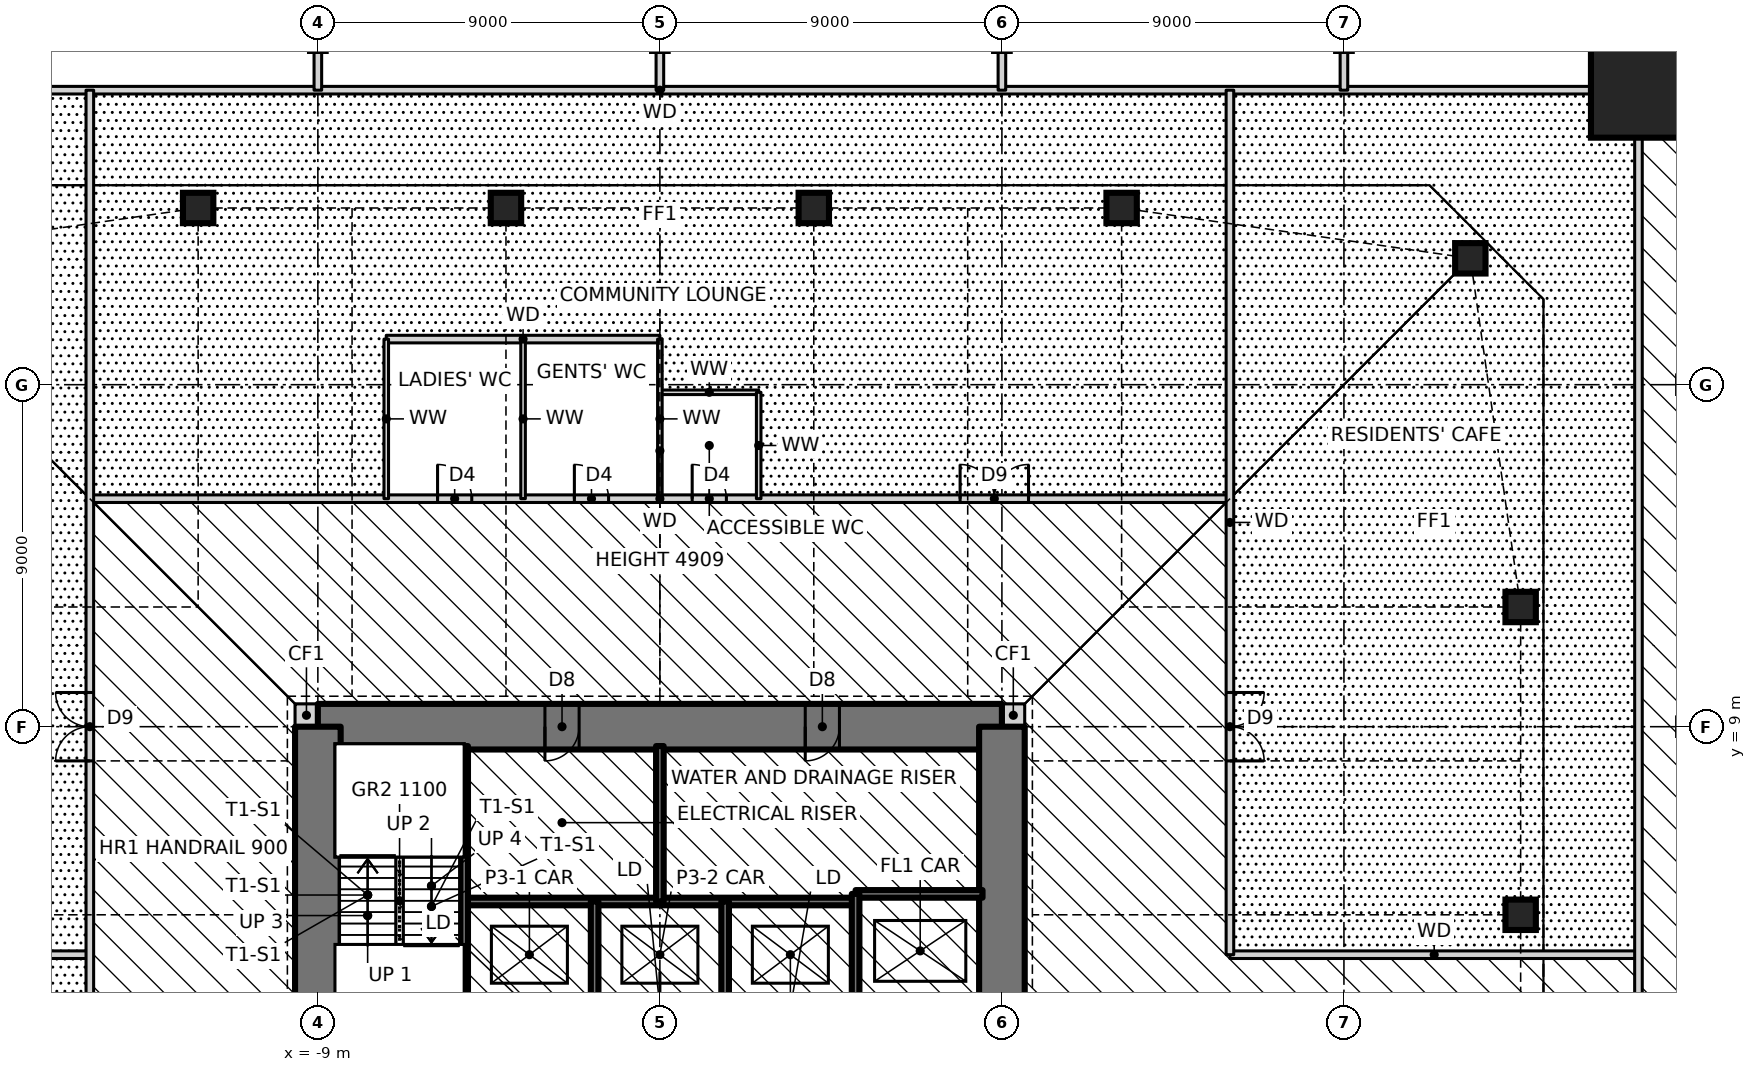
"""IFC4 building model, lengths in metres.
Left out: names, types, materials, properties, quantities, classifications, styles, units other than length and angle.
Written with IfcOpenShell. Run it as: python <this file> out.ifc"""

import sys

from ifc_helpers import new_model, si_unit, direction, frame, frame_2d, origin, origin_2d, place, context, subcontext, project, spatial, rectangle, hollow_rectangle, i_section, extrude, element, fill, save


model = new_model("IFC4")
c1 = context("Model", 3, precision=1e-05, world=origin(), true_north=direction((0.0, 1.0)))
c2 = subcontext(c1, "Body", "Model", "MODEL_VIEW")
j1 = project(units=[si_unit("LENGTHUNIT", "METRE"), si_unit("PLANEANGLEUNIT", "RADIAN")], contexts=[c1])
p1 = place(None, origin())
s1 = spatial("IfcSite", under=j1, at=p1, CompositionType="ELEMENT")
p2 = place(p1, origin())
s2 = spatial("IfcBuilding", under=s1, at=p2, CompositionType="ELEMENT")
p3 = place(p2, origin())
s3 = spatial("IfcBuildingStorey", under=s2, at=p3, CompositionType="ELEMENT", Elevation=0.0)
for number, where, z_axis, x_axis in (
    (1, (22.65, 4.05, 0.0), (0.0, 0.0, 1.0), (1.0, 0.0, 0.0)),
    (2, (22.65, 12.15, 0.0), (0.0, 0.0, 1.0), (1.0, 0.0, 0.0)),
    (3, (21.326, 21.326, 0.0), (0.0, 0.0, 1.0), (1.0, 0.0, 0.0)),
    (4, (12.15, 22.65, 0.0), (0.0, 0.0, 1.0), (1.0, 0.0, 0.0)),
    (5, (4.05, 22.65, 0.0), (0.0, 0.0, 1.0), (1.0, 0.0, 0.0)),
    (6, (-4.05, 22.65, 0.0), (0.0, 0.0, 1.0), (1.0, 0.0, 0.0)),
    (7, (-12.15, 22.65, 0.0), (0.0, 0.0, 1.0), (1.0, 0.0, 0.0)),
):
    element("IfcColumn", number, at=place(p3, frame(where, z_axis=z_axis, x_axis=x_axis)), inside=s3, PredefinedType="COLUMN", context=c2, shape_type="SweptSolid", body=[
        extrude(hollow_rectangle(XDim=0.8, YDim=0.8, WallThickness=0.09, at=origin_2d()), origin(), (0.0, 0.0, 1.0), 6.0),
    ])
p4 = place(p3, frame((27.0, 27.0, 0.0), z_axis=(0.0, 0.0, 1.0), x_axis=(1.0, 0.0, 0.0)))
e8 = element("IfcColumn", 8, at=p4, inside=s3, PredefinedType="COLUMN", context=c2, shape_type="SweptSolid", body=[
    extrude(rectangle(XDim=5.0, YDim=5.0, at=origin_2d()), origin(), (0.0, 0.0, 1.0), 6.0),
    extrude(i_section(OverallWidth=0.478, OverallDepth=0.599, WebThickness=0.1, FlangeThickness=0.14, at=origin_2d()), origin(), (0.0, 0.0, 1.0), 6.0),
])
for number, where, z_axis, x_axis in (
    (9, (9.0, 9.3, 0.0), (0.0, 0.0, 1.0), (1.0, 0.0, 0.0)),
    (10, (-9.6, 9.3, 0.0), (0.0, 0.0, 1.0), (1.0, 0.0, 0.0)),
):
    element("IfcWall", number, at=place(p3, frame(where, z_axis=z_axis, x_axis=x_axis)), inside=s3, PredefinedType="SOLIDWALL", context=c2, shape_type="SweptSolid", body=[
        extrude(rectangle(XDim=0.6, YDim=0.6, at=frame_2d((0.3, 0.0))), origin(), (0.0, 0.0, 1.0), 6.0),
    ])
p5 = place(p3, frame((9.0, 9.0, 0.0), z_axis=(0.0, 0.0, 1.0), x_axis=(-1.0, 0.0, 0.0)))
e11 = element("IfcWall", 11, at=p5, inside=s3, PredefinedType="SHEAR", context=c2, shape_type="SweptSolid", body=[
    extrude(rectangle(XDim=18.0, YDim=1.2, at=frame_2d((9.0, 0.0))), origin(), (0.0, 0.0, 1.0), 6.0),
])
p6 = place(p5, frame((11.125, 0.0, 0.0)))
e12 = element("IfcOpeningElement", 12, at=p6, cuts=e11, PredefinedType="OPENING", context=c2, shape_type="SweptSolid", body=[
    extrude(rectangle(XDim=0.9, YDim=2.1, at=frame_2d((0.45, 1.05))), frame((0.0, 0.61, 0.0), z_axis=(0.0, -1.0, 0.0), x_axis=(1.0, 0.0, 0.0)), (0.0, 0.0, 1.0), 1.22),
])
p7 = place(p5, frame((4.275, 0.0, 0.0)))
e13 = element("IfcOpeningElement", 13, at=p7, cuts=e11, PredefinedType="OPENING", context=c2, shape_type="SweptSolid", body=[
    extrude(rectangle(XDim=0.9, YDim=2.1, at=frame_2d((0.45, 1.05))), frame((0.0, 0.61, 0.0), z_axis=(0.0, -1.0, 0.0), x_axis=(1.0, 0.0, 0.0)), (0.0, 0.0, 1.0), 1.22),
])
p8 = place(p3, frame((9.0, -9.0, 0.0), z_axis=(0.0, 0.0, 1.0), x_axis=(0.0, 1.0, 0.0)))
e14 = element("IfcWall", 14, at=p8, inside=s3, PredefinedType="SHEAR", context=c2, shape_type="SweptSolid", body=[
    extrude(rectangle(XDim=18.0, YDim=1.2, at=frame_2d((9.0, 0.0))), origin(), (0.0, 0.0, 1.0), 6.0),
])
p9 = place(p8, frame((8.5, 0.0, 0.0)))
e15 = element("IfcOpeningElement", 15, at=p9, cuts=e14, PredefinedType="OPENING", context=c2, shape_type="SweptSolid", body=[
    extrude(rectangle(XDim=1.0, YDim=2.1, at=frame_2d((0.5, 1.05))), frame((0.0, 0.61, 0.0), z_axis=(0.0, -1.0, 0.0), x_axis=(1.0, 0.0, 0.0)), (0.0, 0.0, 1.0), 1.22),
])
p10 = place(p3, frame((-9.0, 9.0, 0.0), z_axis=(0.0, 0.0, 1.0), x_axis=(0.0, -1.0, 0.0)))
e16 = element("IfcWall", 16, at=p10, inside=s3, PredefinedType="SHEAR", context=c2, shape_type="SweptSolid", body=[
    extrude(rectangle(XDim=18.0, YDim=1.2, at=frame_2d((9.0, 0.0))), origin(), (0.0, 0.0, 1.0), 6.0),
])
p11 = place(p10, frame((8.5, 0.0, 0.0)))
e17 = element("IfcOpeningElement", 17, at=p11, cuts=e16, PredefinedType="OPENING", context=c2, shape_type="SweptSolid", body=[
    extrude(rectangle(XDim=1.0, YDim=2.1, at=frame_2d((0.5, 1.05))), frame((0.0, 0.61, 0.0), z_axis=(0.0, -1.0, 0.0), x_axis=(1.0, 0.0, 0.0)), (0.0, 0.0, 1.0), 1.22),
])
for number, where, z_axis, x_axis in (
    (18, (-25.75, 3.0, 0.0), (0.0, 0.0, 1.0), (1.0, 0.0, 0.0)),
    (19, (15.0, 3.0, 0.0), (0.0, 0.0, 1.0), (1.0, 0.0, 0.0)),
):
    element("IfcWall", number, at=place(p3, frame(where, z_axis=z_axis, x_axis=x_axis)), inside=s3, PredefinedType="SOLIDWALL", context=c2, shape_type="SweptSolid", body=[
        extrude(rectangle(XDim=10.75, YDim=0.2, at=frame_2d((5.375, 0.0))), origin(), (0.0, 0.0, 1.0), 5.75),
    ])
p12 = place(p3, frame((-5.15, 4.4, 0.0), z_axis=(0.0, 0.0, 1.0), x_axis=(1.0, 0.0, 0.0)))
e20 = element("IfcWall", 20, at=p12, inside=s3, PredefinedType="SOLIDWALL", context=c2, shape_type="SweptSolid", body=[
    extrude(rectangle(XDim=10.3, YDim=0.2, at=frame_2d((5.15, 0.0))), origin(), (0.0, 0.0, 1.0), 6.0),
])
p13 = place(p3, frame((5.15, 4.6, 0.0), z_axis=(0.0, 0.0, 1.0), x_axis=(1.0, 0.0, 0.0)))
e21 = element("IfcWall", 21, at=p13, inside=s3, PredefinedType="SOLIDWALL", context=c2, shape_type="SweptSolid", body=[
    extrude(rectangle(XDim=3.34, YDim=0.2, at=frame_2d((1.67, 0.0))), origin(), (0.0, 0.0, 1.0), 6.0),
])
p14 = place(p3, frame((-15.0, 15.0, 0.0), z_axis=(0.0, 0.0, 1.0), x_axis=(1.0, 0.0, 0.0)))
e22 = element("IfcWall", 22, at=p14, inside=s3, PredefinedType="SOLIDWALL", context=c2, shape_type="SweptSolid", body=[
    extrude(rectangle(XDim=30.0, YDim=0.2, at=frame_2d((15.0, 0.0))), origin(), (0.0, 0.0, 1.0), 5.75),
])
p15 = place(p14, frame((9.15, 0.0, 0.0)))
e23 = element("IfcOpeningElement", 23, at=p15, cuts=e22, PredefinedType="OPENING", context=c2, shape_type="SweptSolid", body=[
    extrude(rectangle(XDim=0.9, YDim=2.1, at=frame_2d((0.45, 1.05))), frame((0.0, 0.11, 0.0), z_axis=(0.0, -1.0, 0.0), x_axis=(1.0, 0.0, 0.0)), (0.0, 0.0, 1.0), 0.22),
])
p16 = place(p14, frame((12.75, 0.0, 0.0)))
e24 = element("IfcOpeningElement", 24, at=p16, cuts=e22, PredefinedType="OPENING", context=c2, shape_type="SweptSolid", body=[
    extrude(rectangle(XDim=0.9, YDim=2.1, at=frame_2d((0.45, 1.05))), frame((0.0, 0.11, 0.0), z_axis=(0.0, -1.0, 0.0), x_axis=(1.0, 0.0, 0.0)), (0.0, 0.0, 1.0), 0.22),
])
p17 = place(p14, frame((15.85, 0.0, 0.0)))
e25 = element("IfcOpeningElement", 25, at=p17, cuts=e22, PredefinedType="OPENING", context=c2, shape_type="SweptSolid", body=[
    extrude(rectangle(XDim=0.9, YDim=2.1, at=frame_2d((0.45, 1.05))), frame((0.0, 0.11, 0.0), z_axis=(0.0, -1.0, 0.0), x_axis=(1.0, 0.0, 0.0)), (0.0, 0.0, 1.0), 0.22),
])
p18 = place(p14, frame((22.9, 0.0, 0.0)))
e26 = element("IfcOpeningElement", 26, at=p18, cuts=e22, PredefinedType="OPENING", context=c2, shape_type="SweptSolid", body=[
    extrude(rectangle(XDim=1.8, YDim=2.1, at=frame_2d((0.9, 1.05))), frame((0.0, 0.11, 0.0), z_axis=(0.0, -1.0, 0.0), x_axis=(1.0, 0.0, 0.0)), (0.0, 0.0, 1.0), 0.22),
])
p19 = place(p3, frame((0.0, 17.8, 0.0), z_axis=(0.0, 0.0, 1.0), x_axis=(1.0, 0.0, 0.0)))
e27 = element("IfcWall", 27, at=p19, inside=s3, PredefinedType="PARTITIONING", context=c2, shape_type="SweptSolid", body=[
    extrude(rectangle(XDim=2.6, YDim=0.12, at=frame_2d((1.3, 0.0))), origin(), (0.0, 0.0, 1.0), 5.75),
])
p20 = place(p3, frame((-7.2, 19.2, 0.0), z_axis=(0.0, 0.0, 1.0), x_axis=(1.0, 0.0, 0.0)))
e28 = element("IfcWall", 28, at=p20, inside=s3, PredefinedType="SOLIDWALL", context=c2, shape_type="SweptSolid", body=[
    extrude(rectangle(XDim=7.2, YDim=0.2, at=frame_2d((3.6, 0.0))), origin(), (0.0, 0.0, 1.0), 5.75),
])
p21 = place(p3, frame((-25.75, 25.75, 0.0), z_axis=(0.0, 0.0, 1.0), x_axis=(1.0, 0.0, 0.0)))
e29 = element("IfcWall", 29, at=p21, inside=s3, PredefinedType="SOLIDWALL", context=c2, shape_type="SweptSolid", body=[
    extrude(rectangle(XDim=51.5, YDim=0.2, at=frame_2d((25.75, 0.0))), origin(), (0.0, 0.0, 1.0), 5.75),
])
p22 = place(p3, frame((25.75, -32.6, 0.0), z_axis=(0.0, 0.0, 1.0), x_axis=(0.0, 1.0, 0.0)))
e30 = element("IfcWall", 30, at=p22, inside=s3, PredefinedType="SOLIDWALL", context=c2, shape_type="SweptSolid", body=[
    extrude(rectangle(XDim=65.2, YDim=0.2, at=frame_2d((32.6, 0.0))), origin(), (0.0, 0.0, 1.0), 5.75),
])
p23 = place(p22, frame((31.2, 0.0, 0.0)))
e31 = element("IfcOpeningElement", 31, at=p23, cuts=e30, PredefinedType="OPENING", context=c2, shape_type="SweptSolid", body=[
    extrude(rectangle(XDim=1.8, YDim=2.4, at=frame_2d((0.9, 1.2))), frame((0.0, 0.11, 0.0), z_axis=(0.0, -1.0, 0.0), x_axis=(1.0, 0.0, 0.0)), (0.0, 0.0, 1.0), 0.22),
])
p24 = place(p3, frame((18.0, 25.75, 0.0), z_axis=(0.0, 0.0, 1.0), x_axis=(0.0, 1.0, 0.0)))
e32 = element("IfcWall", 32, at=p24, inside=s3, PredefinedType="SOLIDWALL", context=c2, shape_type="SweptSolid", body=[
    extrude(rectangle(XDim=10.19, YDim=0.2, at=frame_2d((5.095, 0.0))), origin(), (0.0, 0.0, 1.0), 4.98),
])
p25 = place(p3, frame((15.0, 3.0, 0.0), z_axis=(0.0, 0.0, 1.0), x_axis=(0.0, 1.0, 0.0)))
e33 = element("IfcWall", 33, at=p25, inside=s3, PredefinedType="SOLIDWALL", context=c2, shape_type="SweptSolid", body=[
    extrude(rectangle(XDim=22.75, YDim=0.2, at=frame_2d((11.375, 0.0))), origin(), (0.0, 0.0, 1.0), 5.75),
])
p26 = place(p25, frame((5.1, 0.0, 0.0)))
e34 = element("IfcOpeningElement", 34, at=p26, cuts=e33, PredefinedType="OPENING", context=c2, shape_type="SweptSolid", body=[
    extrude(rectangle(XDim=1.8, YDim=2.1, at=frame_2d((0.9, 1.05))), frame((0.0, 0.11, 0.0), z_axis=(0.0, -1.0, 0.0), x_axis=(1.0, 0.0, 0.0)), (0.0, 0.0, 1.0), 0.22),
])
p27 = place(p3, frame((9.0, 25.75, 0.0), z_axis=(0.0, 0.0, 1.0), x_axis=(0.0, 1.0, 0.0)))
e35 = element("IfcWall", 35, at=p27, inside=s3, PredefinedType="SOLIDWALL", context=c2, shape_type="SweptSolid", body=[
    extrude(rectangle(XDim=10.19, YDim=0.2, at=frame_2d((5.095, 0.0))), origin(), (0.0, 0.0, 1.0), 4.98),
])
p28 = place(p3, frame((5.15, -8.49, 0.0), z_axis=(0.0, 0.0, 1.0), x_axis=(0.0, 1.0, 0.0)))
e36 = element("IfcWall", 36, at=p28, inside=s3, PredefinedType="SOLIDWALL", context=c2, shape_type="SweptSolid", body=[
    extrude(rectangle(XDim=13.09, YDim=0.2, at=frame_2d((6.545, 0.0))), origin(), (0.0, 0.0, 1.0), 6.0),
])
p29 = place(p28, frame((7.89, 0.0, 0.0)))
e37 = element("IfcOpeningElement", 37, at=p29, cuts=e36, PredefinedType="OPENING", context=c2, shape_type="SweptSolid", body=[
    extrude(rectangle(XDim=1.2, YDim=2.1, at=frame_2d((0.6, 1.05))), frame((0.0, 0.11, 0.0), z_axis=(0.0, -1.0, 0.0), x_axis=(1.0, 0.0, 0.0)), (0.0, 0.0, 1.0), 0.22),
])
p30 = place(p3, frame((2.6, 15.0, 0.0), z_axis=(0.0, 0.0, 1.0), x_axis=(0.0, 1.0, 0.0)))
e38 = element("IfcWall", 38, at=p30, inside=s3, PredefinedType="PARTITIONING", context=c2, shape_type="SweptSolid", body=[
    extrude(rectangle(XDim=2.8, YDim=0.12, at=frame_2d((1.4, 0.0))), origin(), (0.0, 0.0, 1.0), 5.75),
])
p31 = place(p3, frame((1.717, 1.6, 0.0), z_axis=(0.0, 0.0, 1.0), x_axis=(0.0, 1.0, 0.0)))
e39 = element("IfcWall", 39, at=p31, inside=s3, PredefinedType="SOLIDWALL", context=c2, shape_type="SweptSolid", body=[
    extrude(rectangle(XDim=2.8, YDim=0.2, at=frame_2d((1.4, 0.0))), origin(), (0.0, 0.0, 1.0), 6.0),
])
p32 = place(p3, frame((0.0, 4.4, 0.0), z_axis=(0.0, 0.0, 1.0), x_axis=(0.0, 1.0, 0.0)))
e40 = element("IfcWall", 40, at=p32, inside=s3, PredefinedType="SOLIDWALL", context=c2, shape_type="SweptSolid", body=[
    extrude(rectangle(XDim=4.09, YDim=0.2, at=frame_2d((2.045, 0.0))), origin(), (0.0, 0.0, 1.0), 6.0),
])
p33 = place(p3, frame((0.0, 15.0, 0.0), z_axis=(0.0, 0.0, 1.0), x_axis=(0.0, 1.0, 0.0)))
e41 = element("IfcWall", 41, at=p33, inside=s3, PredefinedType="PARTITIONING", context=c2, shape_type="SweptSolid", body=[
    extrude(rectangle(XDim=4.2, YDim=0.12, at=frame_2d((2.1, 0.0))), origin(), (0.0, 0.0, 1.0), 4.909),
])
p34 = place(p3, frame((0.0, 25.75, 0.0), z_axis=(0.0, 0.0, 1.0), x_axis=(0.0, 1.0, 0.0)))
e42 = element("IfcWall", 42, at=p34, inside=s3, PredefinedType="SOLIDWALL", context=c2, shape_type="SweptSolid", body=[
    extrude(rectangle(XDim=10.19, YDim=0.2, at=frame_2d((5.095, 0.0))), origin(), (0.0, 0.0, 1.0), 4.98),
])
p35 = place(p3, frame((-1.717, 1.6, 0.0), z_axis=(0.0, 0.0, 1.0), x_axis=(0.0, 1.0, 0.0)))
e43 = element("IfcWall", 43, at=p35, inside=s3, PredefinedType="SOLIDWALL", context=c2, shape_type="SweptSolid", body=[
    extrude(rectangle(XDim=2.8, YDim=0.2, at=frame_2d((1.4, 0.0))), origin(), (0.0, 0.0, 1.0), 6.0),
])
p36 = place(p3, frame((-3.6, 15.0, 0.0), z_axis=(0.0, 0.0, 1.0), x_axis=(0.0, 1.0, 0.0)))
e44 = element("IfcWall", 44, at=p36, inside=s3, PredefinedType="PARTITIONING", context=c2, shape_type="SweptSolid", body=[
    extrude(rectangle(XDim=4.2, YDim=0.12, at=frame_2d((2.1, 0.0))), origin(), (0.0, 0.0, 1.0), 5.75),
])
p37 = place(p3, frame((-5.15, 1.6, 0.0), z_axis=(0.0, 0.0, 1.0), x_axis=(0.0, 1.0, 0.0)))
e45 = element("IfcWall", 45, at=p37, inside=s3, PredefinedType="SOLIDWALL", context=c2, shape_type="SweptSolid", body=[
    extrude(rectangle(XDim=6.89, YDim=0.2, at=frame_2d((3.445, 0.0))), origin(), (0.0, 0.0, 1.0), 6.0),
])
p38 = place(p3, frame((-7.2, 15.0, 0.0), z_axis=(0.0, 0.0, 1.0), x_axis=(0.0, 1.0, 0.0)))
e46 = element("IfcWall", 46, at=p38, inside=s3, PredefinedType="PARTITIONING", context=c2, shape_type="SweptSolid", body=[
    extrude(rectangle(XDim=4.2, YDim=0.12, at=frame_2d((2.1, 0.0))), origin(), (0.0, 0.0, 1.0), 5.75),
])
p39 = place(p3, frame((-9.0, 25.75, 0.0), z_axis=(0.0, 0.0, 1.0), x_axis=(0.0, 1.0, 0.0)))
e47 = element("IfcWall", 47, at=p39, inside=s3, PredefinedType="SOLIDWALL", context=c2, shape_type="SweptSolid", body=[
    extrude(rectangle(XDim=10.19, YDim=0.2, at=frame_2d((5.095, 0.0))), origin(), (0.0, 0.0, 1.0), 4.98),
])
p40 = place(p3, frame((-15.0, -25.75, 0.0), z_axis=(0.0, 0.0, 1.0), x_axis=(0.0, 1.0, 0.0)))
e48 = element("IfcWall", 48, at=p40, inside=s3, PredefinedType="SOLIDWALL", context=c2, shape_type="SweptSolid", body=[
    extrude(rectangle(XDim=51.5, YDim=0.2, at=frame_2d((25.75, 0.0))), origin(), (0.0, 0.0, 1.0), 5.75),
])
p41 = place(p40, frame((33.85, 0.0, 0.0)))
e49 = element("IfcOpeningElement", 49, at=p41, cuts=e48, PredefinedType="OPENING", context=c2, shape_type="SweptSolid", body=[
    extrude(rectangle(XDim=1.8, YDim=2.1, at=frame_2d((0.9, 1.05))), frame((0.0, 0.11, 0.0), z_axis=(0.0, -1.0, 0.0), x_axis=(1.0, 0.0, 0.0)), (0.0, 0.0, 1.0), 0.22),
])
p42 = place(p40, frame((24.85, 0.0, 0.0)))
e50 = element("IfcOpeningElement", 50, at=p42, cuts=e48, PredefinedType="OPENING", context=c2, shape_type="SweptSolid", body=[
    extrude(rectangle(XDim=1.8, YDim=2.1, at=frame_2d((0.9, 1.05))), frame((0.0, 0.11, 0.0), z_axis=(0.0, -1.0, 0.0), x_axis=(1.0, 0.0, 0.0)), (0.0, 0.0, 1.0), 0.22),
])
p43 = place(p40, frame((15.85, 0.0, 0.0)))
e51 = element("IfcOpeningElement", 51, at=p43, cuts=e48, PredefinedType="OPENING", context=c2, shape_type="SweptSolid", body=[
    extrude(rectangle(XDim=1.8, YDim=2.1, at=frame_2d((0.9, 1.05))), frame((0.0, 0.11, 0.0), z_axis=(0.0, -1.0, 0.0), x_axis=(1.0, 0.0, 0.0)), (0.0, 0.0, 1.0), 0.22),
])
p44 = place(p15, origin())
e52 = element("IfcDoor", 52, at=p44, inside=s3, OperationType="SINGLE_SWING_LEFT", PredefinedType="DOOR", context=c2, shape_type="SweptSolid", body=[
    extrude(rectangle(XDim=0.9, YDim=2.1, at=frame_2d((0.45, 1.05))), frame((0.0, 0.025, 0.0), z_axis=(0.0, -1.0, 0.0), x_axis=(1.0, 0.0, 0.0)), (0.0, 0.0, 1.0), 0.05),
])
fill(e23, e52)
p45 = place(p16, origin())
e53 = element("IfcDoor", 53, at=p45, inside=s3, OperationType="SINGLE_SWING_LEFT", PredefinedType="DOOR", context=c2, shape_type="SweptSolid", body=[
    extrude(rectangle(XDim=0.9, YDim=2.1, at=frame_2d((0.45, 1.05))), frame((0.0, 0.025, 0.0), z_axis=(0.0, -1.0, 0.0), x_axis=(1.0, 0.0, 0.0)), (0.0, 0.0, 1.0), 0.05),
])
fill(e24, e53)
p46 = place(p17, origin())
e54 = element("IfcDoor", 54, at=p46, inside=s3, OperationType="SINGLE_SWING_LEFT", PredefinedType="DOOR", context=c2, shape_type="SweptSolid", body=[
    extrude(rectangle(XDim=0.9, YDim=2.1, at=frame_2d((0.45, 1.05))), frame((0.0, 0.025, 0.0), z_axis=(0.0, -1.0, 0.0), x_axis=(1.0, 0.0, 0.0)), (0.0, 0.0, 1.0), 0.05),
])
fill(e25, e54)
p47 = place(p26, frame((1.8, 0.0, 0.0), z_axis=(0.0, 0.0, 1.0), x_axis=(-1.0, 0.0, 0.0)))
e55 = element("IfcDoor", 55, at=p47, inside=s3, OperationType="DOUBLE_DOOR_SINGLE_SWING", PredefinedType="DOOR", context=c2, shape_type="SweptSolid", body=[
    extrude(rectangle(XDim=1.8, YDim=2.1, at=frame_2d((0.9, 1.05))), frame((0.0, 0.025, 0.0), z_axis=(0.0, -1.0, 0.0), x_axis=(1.0, 0.0, 0.0)), (0.0, 0.0, 1.0), 0.05),
])
fill(e34, e55)
p48 = place(p18, origin())
e56 = element("IfcDoor", 56, at=p48, inside=s3, OperationType="DOUBLE_DOOR_SINGLE_SWING", PredefinedType="DOOR", context=c2, shape_type="SweptSolid", body=[
    extrude(rectangle(XDim=1.8, YDim=2.1, at=frame_2d((0.9, 1.05))), frame((0.0, 0.025, 0.0), z_axis=(0.0, -1.0, 0.0), x_axis=(1.0, 0.0, 0.0)), (0.0, 0.0, 1.0), 0.05),
])
fill(e26, e56)
p49 = place(p41, origin())
e57 = element("IfcDoor", 57, at=p49, inside=s3, OperationType="DOUBLE_DOOR_SINGLE_SWING", PredefinedType="DOOR", context=c2, shape_type="SweptSolid", body=[
    extrude(rectangle(XDim=1.8, YDim=2.1, at=frame_2d((0.9, 1.05))), frame((0.0, 0.025, 0.0), z_axis=(0.0, -1.0, 0.0), x_axis=(1.0, 0.0, 0.0)), (0.0, 0.0, 1.0), 0.05),
])
fill(e49, e57)
p50 = place(p6, origin())
e58 = element("IfcDoor", 58, at=p50, inside=s3, OperationType="SINGLE_SWING_RIGHT", PredefinedType="DOOR", context=c2, shape_type="SweptSolid", body=[
    extrude(rectangle(XDim=0.9, YDim=2.1, at=frame_2d((0.45, 1.05))), frame((0.0, 0.025, 0.0), z_axis=(0.0, -1.0, 0.0), x_axis=(1.0, 0.0, 0.0)), (0.0, 0.0, 1.0), 0.05),
])
fill(e12, e58)
p51 = place(p7, origin())
e59 = element("IfcDoor", 59, at=p51, inside=s3, OperationType="SINGLE_SWING_RIGHT", PredefinedType="DOOR", context=c2, shape_type="SweptSolid", body=[
    extrude(rectangle(XDim=0.9, YDim=2.1, at=frame_2d((0.45, 1.05))), frame((0.0, 0.025, 0.0), z_axis=(0.0, -1.0, 0.0), x_axis=(1.0, 0.0, 0.0)), (0.0, 0.0, 1.0), 0.05),
])
fill(e13, e59)
save(model, sys.argv[1])
